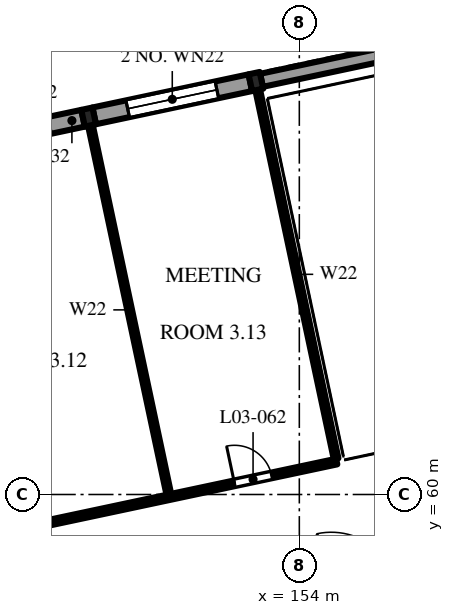
"""IFC4 building model, lengths in metres.
Left out: names, types, materials, properties, quantities, classifications, styles, units other than length and angle.
Written with IfcOpenShell. Run it as: python <this file> out.ifc"""

import sys

from ifc_helpers import new_model, si_unit, direction, frame, frame_2d, origin, origin_2d, place, context, subcontext, project, spatial, polyline, rectangle, i_section, outline, extrude, element, fill, save


model = new_model("IFC4")
c1 = context("Model", 3, precision=1e-05, world=origin(), true_north=direction((0.0, 1.0)))
c2 = subcontext(c1, "Body", "Model", "MODEL_VIEW")
j1 = project(units=[si_unit("LENGTHUNIT", "METRE"), si_unit("PLANEANGLEUNIT", "RADIAN")], contexts=[c1])
p1 = place(None, origin())
s1 = spatial("IfcSite", under=j1, at=p1, CompositionType="ELEMENT")
p2 = place(p1, origin())
s2 = spatial("IfcBuilding", under=s1, at=p2, CompositionType="ELEMENT")
p3 = place(p2, frame((0.0, 0.0, 16.8)))
s3 = spatial("IfcBuildingStorey", under=s2, at=p3, CompositionType="ELEMENT", Elevation=16.8)
for number, where, z_axis, x_axis in (
    (1, (148.456, 69.932, 0.0), (0.0, 0.0, 1.0), (0.978, 0.208, 0.0)),
    (2, (152.858, 70.868, 0.0), (0.0, 0.0, 1.0), (0.978, 0.208, 0.0)),
):
    element("IfcColumn", number, at=place(p3, frame(where, z_axis=z_axis, x_axis=x_axis)), inside=s3, PredefinedType="COLUMN", context=c2, shape_type="SweptSolid", body=[
        extrude(i_section(OverallWidth=0.3, OverallDepth=0.45, WebThickness=0.014, FlangeThickness=0.026, FilletRadius=0.027, at=origin_2d()), origin(), (0.0, 0.0, 1.0), 4.8),
    ])
p4 = place(p3, frame((144.201, 69.028, 0.0), z_axis=(0.0, 0.0, 1.0), x_axis=(0.978143927149, 0.207928972925, 0.0)))
e3 = element("IfcWall", 3, at=p4, inside=s3, PredefinedType="SOLIDWALL", context=c2, shape_type="SweptSolid", body=[
    extrude(outline(polyline([(0.0, 0.0), (4.2, 0.0), (4.2, 11.91), (0.0, 11.686), (0.0, 0.0)])), frame((0.0, 0.225, 0.0), z_axis=(0.0, -1.0, 0.0), x_axis=(1.0, 0.0, 0.0)), (0.0, 0.0, 1.0), 0.45),
])
p5 = place(p4, frame((0.9, 0.0, 0.9)))
e4 = element("IfcOpeningElement", 4, at=p5, cuts=e3, PredefinedType="OPENING", context=c2, shape_type="SweptSolid", body=[
    extrude(rectangle(XDim=2.4, YDim=2.4, at=frame_2d((1.2, 1.2))), frame((0.0, 0.235, 0.0), z_axis=(0.0, -1.0, 0.0), x_axis=(1.0, 0.0, 0.0)), (0.0, 0.0, 1.0), 0.47),
])
p6 = place(p4, frame((0.9, 0.0, 5.1)))
e5 = element("IfcOpeningElement", 5, at=p6, cuts=e3, PredefinedType="OPENING", context=c2, shape_type="SweptSolid", body=[
    extrude(rectangle(XDim=2.4, YDim=2.4, at=frame_2d((1.2, 1.2))), frame((0.0, 0.235, 0.0), z_axis=(0.0, -1.0, 0.0), x_axis=(1.0, 0.0, 0.0)), (0.0, 0.0, 1.0), 0.47),
])
p7 = place(p3, frame((148.603, 69.964, 0.0), z_axis=(0.0, 0.0, 1.0), x_axis=(0.978143927149, 0.207928972925, 0.0)))
e6 = element("IfcWall", 6, at=p7, inside=s3, PredefinedType="SOLIDWALL", context=c2, shape_type="SweptSolid", body=[
    extrude(outline(polyline([(0.0, 0.0), (4.2, 0.0), (4.2, 12.151), (0.0, 11.927), (0.0, 0.0)])), frame((0.0, 0.225, 0.0), z_axis=(0.0, -1.0, 0.0), x_axis=(1.0, 0.0, 0.0)), (0.0, 0.0, 1.0), 0.45),
])
p8 = place(p7, frame((0.9, 0.0, 0.9)))
e7 = element("IfcOpeningElement", 7, at=p8, cuts=e6, PredefinedType="OPENING", context=c2, shape_type="SweptSolid", body=[
    extrude(rectangle(XDim=2.4, YDim=2.4, at=frame_2d((1.2, 1.2))), frame((0.0, 0.235, 0.0), z_axis=(0.0, -1.0, 0.0), x_axis=(1.0, 0.0, 0.0)), (0.0, 0.0, 1.0), 0.47),
])
p9 = place(p7, frame((0.9, 0.0, 5.1)))
e8 = element("IfcOpeningElement", 8, at=p9, cuts=e6, PredefinedType="OPENING", context=c2, shape_type="SweptSolid", body=[
    extrude(rectangle(XDim=2.4, YDim=2.4, at=frame_2d((1.2, 1.2))), frame((0.0, 0.235, 0.0), z_axis=(0.0, -1.0, 0.0), x_axis=(1.0, 0.0, 0.0)), (0.0, 0.0, 1.0), 0.47),
])
p10 = place(p3, frame((153.004, 70.899, 0.0), z_axis=(0.0, 0.0, 1.0), x_axis=(0.978143927149, 0.207928972925, 0.0)))
e9 = element("IfcWall", 9, at=p10, inside=s3, PredefinedType="SOLIDWALL", context=c2, shape_type="SweptSolid", body=[
    extrude(outline(polyline([(0.0, 0.0), (4.2, 0.0), (4.2, 12.392), (0.0, 12.167), (0.0, 0.0)])), frame((0.0, 0.175, 0.0), z_axis=(0.0, -1.0, 0.0), x_axis=(1.0, 0.0, 0.0)), (0.0, 0.0, 1.0), 0.35),
])
p11 = place(p3, frame((151.32, 56.458, 0.0), z_axis=(0.0, 0.0, 1.0), x_axis=(0.97814787394, 0.207910405482, 0.0)))
e10 = element("IfcWall", 10, at=p11, inside=s3, PredefinedType="PARTITIONING", context=c2, shape_type="SweptSolid", body=[
    extrude(outline(polyline([(0.0, 0.0), (45.0, 0.0), (45.0, 12.948), (0.0, 10.54), (0.0, 0.0)])), frame((0.0, 0.075, 0.0), z_axis=(0.0, -1.0, 0.0), x_axis=(1.0, 0.0, 0.0)), (0.0, 0.0, 1.0), 0.15),
])
p12 = place(p11, frame((3.6, 0.0, 0.0)))
e11 = element("IfcOpeningElement", 11, at=p12, cuts=e10, PredefinedType="OPENING", context=c2, shape_type="SweptSolid", body=[
    extrude(rectangle(XDim=1.8, YDim=2.1, at=frame_2d((0.9, 1.05))), frame((0.0, 0.085, 0.0), z_axis=(0.0, -1.0, 0.0), x_axis=(1.0, 0.0, 0.0)), (0.0, 0.0, 1.0), 0.17),
])
p13 = place(p11, frame((10.75, 0.0, 0.0)))
e12 = element("IfcOpeningElement", 12, at=p13, cuts=e10, PredefinedType="OPENING", context=c2, shape_type="SweptSolid", body=[
    extrude(rectangle(XDim=1.0, YDim=2.1, at=frame_2d((0.5, 1.05))), frame((0.0, 0.085, 0.0), z_axis=(0.0, -1.0, 0.0), x_axis=(1.0, 0.0, 0.0)), (0.0, 0.0, 1.0), 0.17),
])
p14 = place(p11, frame((17.1, 0.0, 0.0)))
e13 = element("IfcOpeningElement", 13, at=p14, cuts=e10, PredefinedType="OPENING", context=c2, shape_type="SweptSolid", body=[
    extrude(rectangle(XDim=1.8, YDim=2.1, at=frame_2d((0.9, 1.05))), frame((0.0, 0.085, 0.0), z_axis=(0.0, -1.0, 0.0), x_axis=(1.0, 0.0, 0.0)), (0.0, 0.0, 1.0), 0.17),
])
p15 = place(p11, frame((24.25, 0.0, 0.0)))
e14 = element("IfcOpeningElement", 14, at=p15, cuts=e10, PredefinedType="OPENING", context=c2, shape_type="SweptSolid", body=[
    extrude(rectangle(XDim=1.0, YDim=2.1, at=frame_2d((0.5, 1.05))), frame((0.0, 0.085, 0.0), z_axis=(0.0, -1.0, 0.0), x_axis=(1.0, 0.0, 0.0)), (0.0, 0.0, 1.0), 0.17),
])
p16 = place(p11, frame((30.75, 0.0, 0.0)))
e15 = element("IfcOpeningElement", 15, at=p16, cuts=e10, PredefinedType="OPENING", context=c2, shape_type="SweptSolid", body=[
    extrude(rectangle(XDim=1.5, YDim=2.1, at=frame_2d((0.75, 1.05))), frame((0.0, 0.085, 0.0), z_axis=(0.0, -1.0, 0.0), x_axis=(1.0, 0.0, 0.0)), (0.0, 0.0, 1.0), 0.17),
])
p17 = place(p11, frame((39.6, 0.0, 0.0)))
e16 = element("IfcOpeningElement", 16, at=p17, cuts=e10, PredefinedType="OPENING", context=c2, shape_type="SweptSolid", body=[
    extrude(rectangle(XDim=1.8, YDim=2.1, at=frame_2d((0.9, 1.05))), frame((0.0, 0.085, 0.0), z_axis=(0.0, -1.0, 0.0), x_axis=(1.0, 0.0, 0.0)), (0.0, 0.0, 1.0), 0.17),
])
p18 = place(p3, frame((115.369, 52.446, 0.0), z_axis=(0.0, 0.0, 1.0), x_axis=(0.978147680869, 0.207911313813, 0.0)))
e17 = element("IfcWall", 17, at=p18, inside=s3, PredefinedType="PARTITIONING", context=c2, shape_type="SweptSolid", body=[
    extrude(outline(polyline([(0.0, 0.0), (40.5, 0.0), (40.5, 10.595), (0.0, 8.428), (0.0, 0.0)])), frame((0.0, 0.075, 0.0), z_axis=(0.0, -1.0, 0.0), x_axis=(1.0, 0.0, 0.0)), (0.0, 0.0, 1.0), 0.15),
])
p19 = place(p18, frame((5.85, 0.0, 0.0)))
e18 = element("IfcOpeningElement", 18, at=p19, cuts=e17, PredefinedType="OPENING", context=c2, shape_type="SweptSolid", body=[
    extrude(rectangle(XDim=1.8, YDim=2.1, at=frame_2d((0.9, 1.05))), frame((0.0, 0.085, 0.0), z_axis=(0.0, -1.0, 0.0), x_axis=(1.0, 0.0, 0.0)), (0.0, 0.0, 1.0), 0.17),
])
p20 = place(p18, frame((17.1, 0.0, 0.0)))
e19 = element("IfcOpeningElement", 19, at=p20, cuts=e17, PredefinedType="OPENING", context=c2, shape_type="SweptSolid", body=[
    extrude(rectangle(XDim=1.8, YDim=2.1, at=frame_2d((0.9, 1.05))), frame((0.0, 0.085, 0.0), z_axis=(0.0, -1.0, 0.0), x_axis=(1.0, 0.0, 0.0)), (0.0, 0.0, 1.0), 0.17),
])
p21 = place(p18, frame((28.35, 0.0, 0.0)))
e20 = element("IfcOpeningElement", 20, at=p21, cuts=e17, PredefinedType="OPENING", context=c2, shape_type="SweptSolid", body=[
    extrude(rectangle(XDim=1.8, YDim=2.1, at=frame_2d((0.9, 1.05))), frame((0.0, 0.085, 0.0), z_axis=(0.0, -1.0, 0.0), x_axis=(1.0, 0.0, 0.0)), (0.0, 0.0, 1.0), 0.17),
])
p22 = place(p18, frame((37.75, 0.0, 0.0)))
e21 = element("IfcOpeningElement", 21, at=p22, cuts=e17, PredefinedType="OPENING", context=c2, shape_type="SweptSolid", body=[
    extrude(rectangle(XDim=1.0, YDim=2.1, at=frame_2d((0.5, 1.05))), frame((0.0, 0.085, 0.0), z_axis=(0.0, -1.0, 0.0), x_axis=(1.0, 0.0, 0.0)), (0.0, 0.0, 1.0), 0.17),
])
p23 = place(p3, frame((148.503, 69.712, 0.0), z_axis=(0.0, 0.0, 1.0), x_axis=(0.207904355568, -0.978149159861, 0.0)))
e22 = element("IfcWall", 22, at=p23, inside=s3, PredefinedType="PARTITIONING", context=c2, shape_type="SweptSolid", body=[
    extrude(outline(polyline([(0.0, 0.0), (9.925, 0.0), (9.925, 9.825), (0.0, 9.825), (0.0, 0.0)])), frame((0.0, 0.062, 0.0), z_axis=(0.0, -1.0, 0.0), x_axis=(1.0, 0.0, 0.0)), (0.0, 0.0, 1.0), 0.125),
])
p24 = place(p3, frame((152.905, 70.648, 0.0), z_axis=(0.0, 0.0, 1.0), x_axis=(0.20790935802, -0.978148096582, 0.0)))
e23 = element("IfcWall", 23, at=p24, inside=s3, PredefinedType="PARTITIONING", context=c2, shape_type="SweptSolid", body=[
    extrude(outline(polyline([(0.0, 0.0), (9.925, 0.0), (9.925, 10.066), (0.0, 10.066), (0.0, 0.0)])), frame((0.0, 0.062, 0.0), z_axis=(0.0, -1.0, 0.0), x_axis=(1.0, 0.0, 0.0)), (0.0, 0.0, 1.0), 0.125),
])
p25 = place(p8, origin())
e24 = element("IfcWindow", 24, at=p25, inside=s3, PartitioningType="SINGLE_PANEL", PredefinedType="WINDOW", context=c2, shape_type="SweptSolid", body=[
    extrude(rectangle(XDim=2.4, YDim=2.4, at=frame_2d((1.2, 1.2))), frame((0.0, 0.03, 0.0), z_axis=(0.0, -1.0, 0.0), x_axis=(1.0, 0.0, 0.0)), (0.0, 0.0, 1.0), 0.06),
])
fill(e7, e24)
p26 = place(p9, origin())
e25 = element("IfcWindow", 25, at=p26, inside=s3, PartitioningType="SINGLE_PANEL", PredefinedType="WINDOW", context=c2, shape_type="SweptSolid", body=[
    extrude(rectangle(XDim=2.4, YDim=2.4, at=frame_2d((1.2, 1.2))), frame((0.0, 0.03, 0.0), z_axis=(0.0, -1.0, 0.0), x_axis=(1.0, 0.0, 0.0)), (0.0, 0.0, 1.0), 0.06),
])
fill(e8, e25)
p27 = place(p22, origin())
e26 = element("IfcDoor", 26, at=p27, inside=s3, OperationType="SINGLE_SWING_RIGHT", PredefinedType="DOOR", context=c2, shape_type="SweptSolid", body=[
    extrude(rectangle(XDim=1.0, YDim=2.1, at=frame_2d((0.5, 1.05))), frame((0.0, 0.025, 0.0), z_axis=(0.0, -1.0, 0.0), x_axis=(1.0, 0.0, 0.0)), (0.0, 0.0, 1.0), 0.05),
])
fill(e21, e26)
save(model, sys.argv[1])
